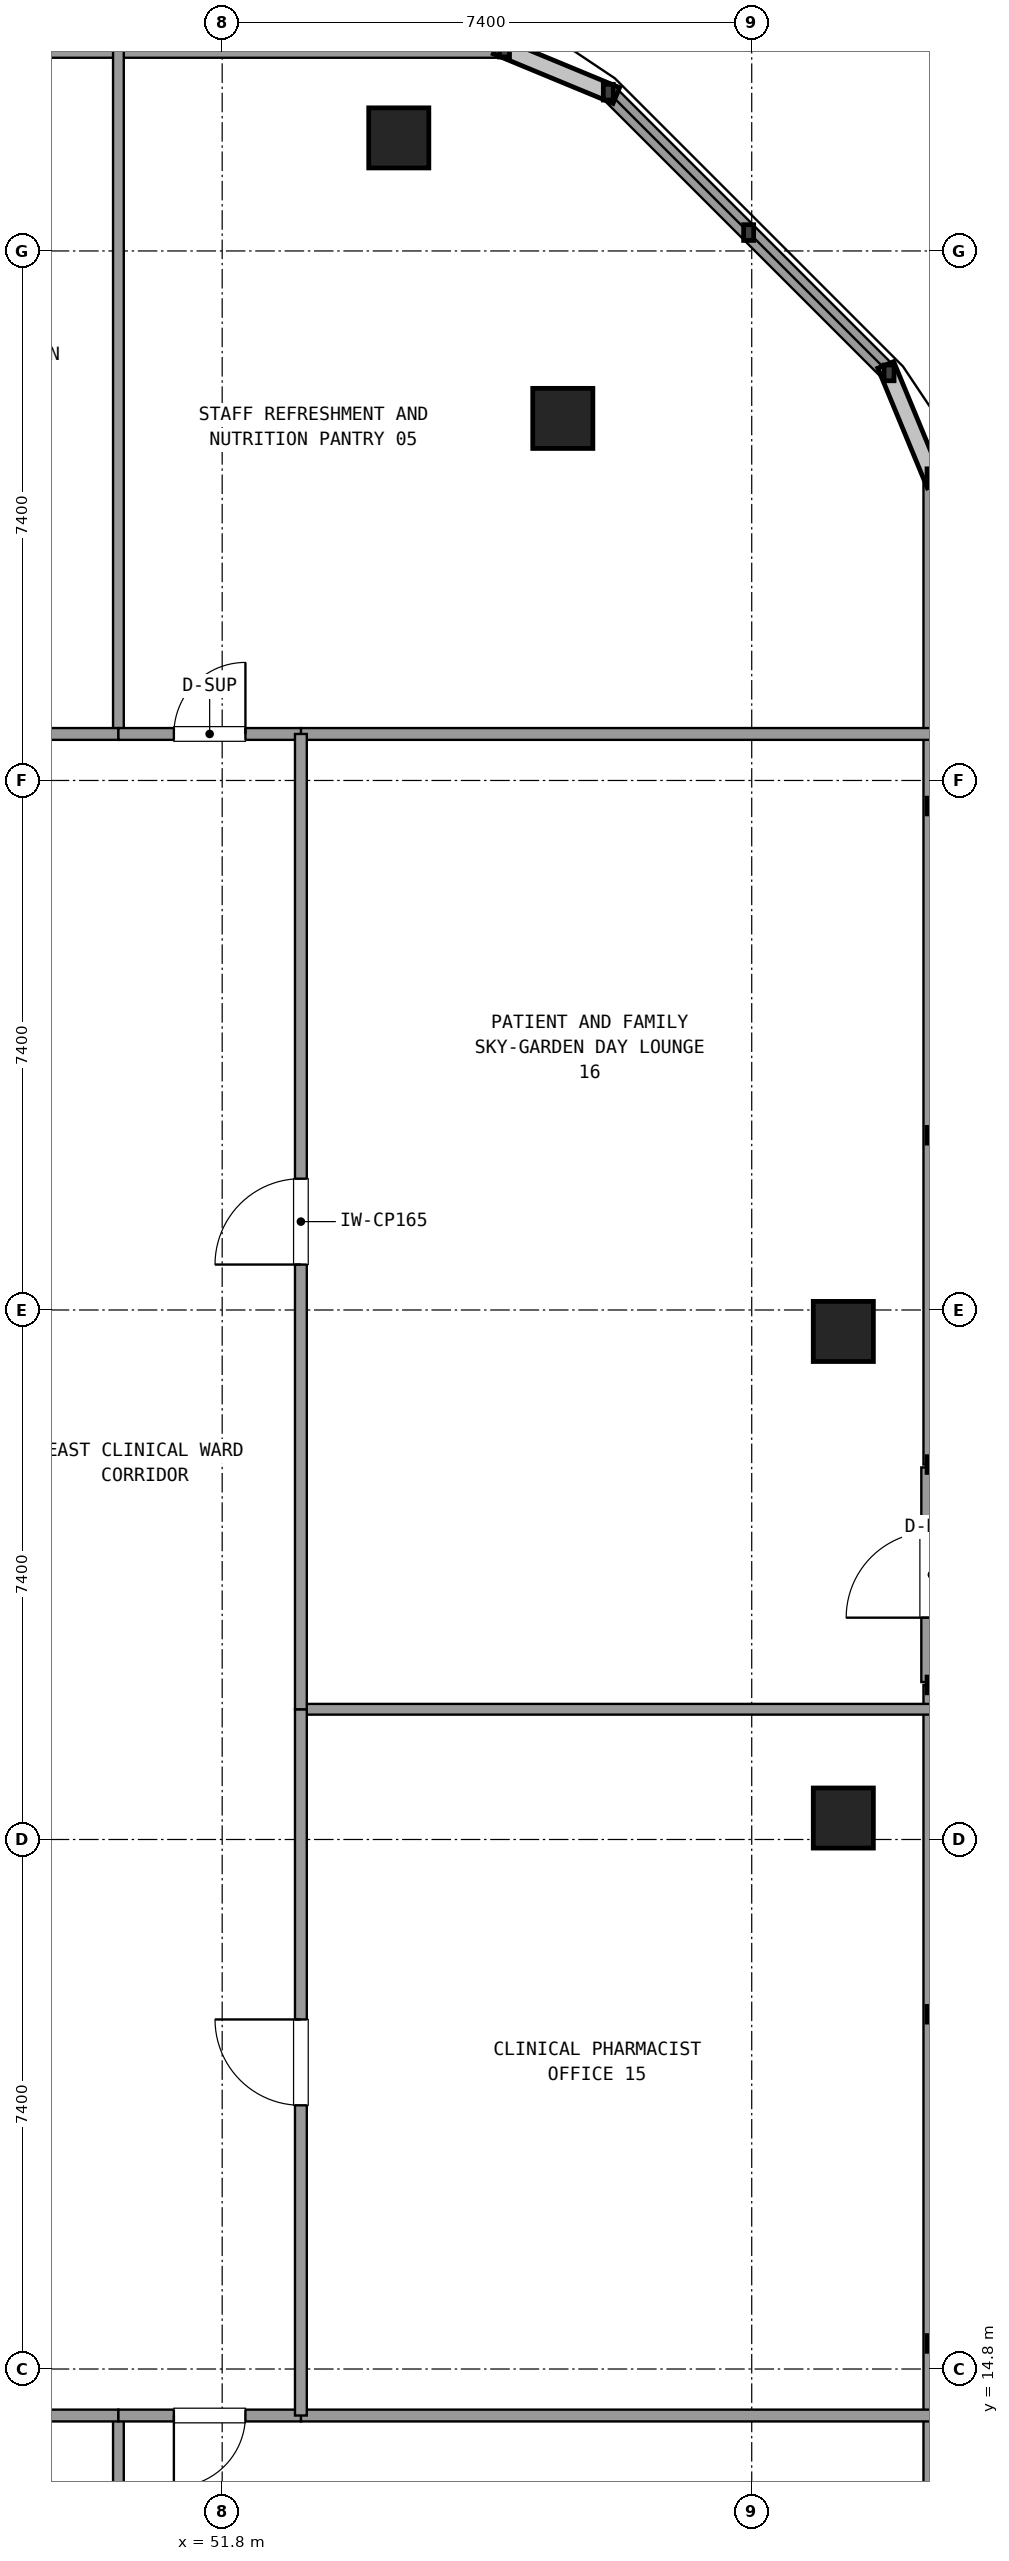
"""IFC4 building model, lengths in metres.
Left out: names, types, materials, properties, quantities, classifications, styles, units other than length and angle.
Written with IfcOpenShell. Run it as: python <this file> out.ifc"""

import sys

from ifc_helpers import new_model, si_unit, direction, frame, frame_2d, origin, origin_2d, place, context, subcontext, project, spatial, rectangle, extrude, element, fill, save


model = new_model("IFC4")
c1 = context("Model", 3, precision=1e-05, world=origin(), true_north=direction((0.0, 1.0)))
c2 = subcontext(c1, "Body", "Model", "MODEL_VIEW")
j1 = project(units=[si_unit("LENGTHUNIT", "METRE"), si_unit("PLANEANGLEUNIT", "RADIAN")], contexts=[c1])
p1 = place(None, origin())
s1 = spatial("IfcSite", under=j1, at=p1, CompositionType="ELEMENT")
p2 = place(p1, origin())
s2 = spatial("IfcBuilding", under=s1, at=p2, CompositionType="ELEMENT")
p3 = place(p2, frame((0.0, 0.0, 242.82)))
s3 = spatial("IfcBuildingStorey", under=s2, at=p3, CompositionType="ELEMENT", Elevation=242.82)
for number, where, z_axis, x_axis in (
    (1, (60.48, 22.5, 0.0), (0.0, 0.0, 1.0), (1.0, 0.0, 0.0)),
    (2, (60.48, 29.3, 0.0), (0.0, 0.0, 1.0), (1.0, 0.0, 0.0)),
    (3, (56.56, 42.06, 0.0), (0.0, 0.0, 1.0), (1.0, 0.0, 0.0)),
    (4, (54.268, 45.98, 0.0), (0.0, 0.0, 1.0), (1.0, 0.0, 0.0)),
):
    element("IfcColumn", number, at=place(p3, frame(where, z_axis=z_axis, x_axis=x_axis)), inside=s3, PredefinedType="COLUMN", context=c2, shape_type="SweptSolid", body=[
        extrude(rectangle(XDim=0.84, YDim=0.84, at=origin_2d()), origin(), (0.0, 0.0, 1.0), 3.6),
    ])
p4 = place(p3, frame((61.72, 24.4, 0.0), z_axis=(0.0, 0.0, 1.0), x_axis=(0.0, 1.0, 0.0)))
e5 = element("IfcWall", 5, at=p4, inside=s3, PredefinedType="SOLIDWALL", context=c2, shape_type="SweptSolid", body=[
    extrude(rectangle(XDim=3.0, YDim=0.3, at=frame_2d((1.5, 0.0))), origin(), (0.0, 0.0, 1.0), 2.69),
])
p5 = place(p4, frame((0.9, 0.0, 0.0)))
e6 = element("IfcOpeningElement", 6, at=p5, cuts=e5, PredefinedType="OPENING", context=c2, shape_type="SweptSolid", body=[
    extrude(rectangle(XDim=1.2, YDim=2.2, at=frame_2d((0.6, 1.1))), frame((0.0, 0.16, 0.0), z_axis=(0.0, -1.0, 0.0), x_axis=(1.0, 0.0, 0.0)), (0.0, 0.0, 1.0), 0.32),
])
for number, where, z_axis, x_axis in (
    (7, (61.72, 10.555, 0.0), (0.0, 0.0, 1.0), (0.0, 1.0, 0.0)),
    (8, (61.72, 27.44, 0.0), (0.0, 0.0, 1.0), (0.0, 1.0, 0.0)),
):
    element("IfcWall", number, at=place(p3, frame(where, z_axis=z_axis, x_axis=x_axis)), inside=s3, PredefinedType="SOLIDWALL", context=c2, shape_type="SweptSolid", body=[
        extrude(rectangle(XDim=13.805, YDim=0.24, at=frame_2d((6.903, 0.0))), origin(), (0.0, 0.0, 1.0), 0.85),
    ])
p6 = place(p3, frame((61.119, 42.696, 0.0), z_axis=(0.0, 0.0, 1.0), x_axis=(-0.707106781187, 0.707106781187, 0.0)))
e9 = element("IfcWall", 9, at=p6, inside=s3, PredefinedType="SOLIDWALL", context=c2, shape_type="SweptSolid", body=[
    extrude(rectangle(XDim=5.548, YDim=0.24, at=frame_2d((2.774, 0.0))), origin(), (0.0, 0.0, 1.0), 0.85),
])
p7 = place(p3, frame((55.745, 47.22, 0.0), z_axis=(0.0, 0.0, 1.0), x_axis=(-1.0, 0.0, 0.0)))
e10 = element("IfcWall", 10, at=p7, inside=s3, PredefinedType="SOLIDWALL", context=c2, shape_type="SweptSolid", body=[
    extrude(rectangle(XDim=37.49, YDim=0.24, at=frame_2d((18.745, 0.0))), origin(), (0.0, 0.0, 1.0), 0.85),
])
for number, where, z_axis, x_axis in (
    (11, (52.9, 37.65, 0.0), (0.0, 0.0, 1.0), (1.0, 0.0, 0.0)),
    (12, (52.9, 14.15, 0.0), (0.0, 0.0, 1.0), (1.0, 0.0, 0.0)),
):
    element("IfcWall", number, at=place(p3, frame(where, z_axis=z_axis, x_axis=x_axis)), inside=s3, PredefinedType="PARTITIONING", context=c2, shape_type="SweptSolid", body=[
        extrude(rectangle(XDim=8.8, YDim=0.165, at=frame_2d((4.4, 0.0))), origin(), (0.0, 0.0, 1.0), 2.61),
    ])
p8 = place(p3, frame((50.35, 37.65, 0.0), z_axis=(0.0, 0.0, 1.0), x_axis=(0.0, 1.0, 0.0)))
e13 = element("IfcWall", 13, at=p8, inside=s3, PredefinedType="PARTITIONING", context=c2, shape_type="SweptSolid", body=[
    extrude(rectangle(XDim=9.55, YDim=0.15, at=frame_2d((4.775, 0.0))), origin(), (0.0, 0.0, 1.0), 2.61),
])
p9 = place(p3, frame((45.525, 37.65, 0.0), z_axis=(0.0, 0.0, 1.0), x_axis=(1.0, 0.0, 0.0)))
e14 = element("IfcWall", 14, at=p9, inside=s3, PredefinedType="PARTITIONING", context=c2, shape_type="SweptSolid", body=[
    extrude(rectangle(XDim=4.825, YDim=0.165, at=frame_2d((2.413, 0.0))), origin(), (0.0, 0.0, 1.0), 2.61),
])
p10 = place(p9, frame((1.813, 0.0, 0.0)))
e15 = element("IfcOpeningElement", 15, at=p10, cuts=e14, PredefinedType="OPENING", context=c2, shape_type="SweptSolid", body=[
    extrude(rectangle(XDim=1.2, YDim=2.15, at=frame_2d((0.6, 1.075))), frame((0.0, 0.093, 0.0), z_axis=(0.0, -1.0, 0.0), x_axis=(1.0, 0.0, 0.0)), (0.0, 0.0, 1.0), 0.185),
])
p11 = place(p3, frame((50.35, 37.65, 0.0), z_axis=(0.0, 0.0, 1.0), x_axis=(1.0, 0.0, 0.0)))
e16 = element("IfcWall", 16, at=p11, inside=s3, PredefinedType="PARTITIONING", context=c2, shape_type="SweptSolid", body=[
    extrude(rectangle(XDim=2.55, YDim=0.165, at=frame_2d((1.275, 0.0))), origin(), (0.0, 0.0, 1.0), 2.61),
])
p12 = place(p11, frame((0.775, 0.0, 0.0)))
e17 = element("IfcOpeningElement", 17, at=p12, cuts=e16, PredefinedType="OPENING", context=c2, shape_type="SweptSolid", body=[
    extrude(rectangle(XDim=1.0, YDim=2.15, at=frame_2d((0.5, 1.075))), frame((0.0, 0.093, 0.0), z_axis=(0.0, -1.0, 0.0), x_axis=(1.0, 0.0, 0.0)), (0.0, 0.0, 1.0), 0.185),
])
p13 = place(p3, frame((50.35, 14.15, 0.0), z_axis=(0.0, 0.0, 1.0), x_axis=(0.0, -1.0, 0.0)))
e18 = element("IfcWall", 18, at=p13, inside=s3, PredefinedType="PARTITIONING", context=c2, shape_type="SweptSolid", body=[
    extrude(rectangle(XDim=9.55, YDim=0.15, at=frame_2d((4.775, 0.0))), origin(), (0.0, 0.0, 1.0), 2.61),
])
p14 = place(p3, frame((45.051, 14.15, 0.0), z_axis=(0.0, 0.0, 1.0), x_axis=(1.0, 0.0, 0.0)))
e19 = element("IfcWall", 19, at=p14, inside=s3, PredefinedType="PARTITIONING", context=c2, shape_type="SweptSolid", body=[
    extrude(rectangle(XDim=5.299, YDim=0.165, at=frame_2d((2.649, 0.0))), origin(), (0.0, 0.0, 1.0), 2.61),
])
p15 = place(p14, frame((2.049, 0.0, 0.0)))
e20 = element("IfcOpeningElement", 20, at=p15, cuts=e19, PredefinedType="OPENING", context=c2, shape_type="SweptSolid", body=[
    extrude(rectangle(XDim=1.2, YDim=2.15, at=frame_2d((0.6, 1.075))), frame((0.0, 0.093, 0.0), z_axis=(0.0, -1.0, 0.0), x_axis=(1.0, 0.0, 0.0)), (0.0, 0.0, 1.0), 0.185),
])
p16 = place(p3, frame((50.35, 14.15, 0.0), z_axis=(0.0, 0.0, 1.0), x_axis=(1.0, 0.0, 0.0)))
e21 = element("IfcWall", 21, at=p16, inside=s3, PredefinedType="PARTITIONING", context=c2, shape_type="SweptSolid", body=[
    extrude(rectangle(XDim=2.55, YDim=0.165, at=frame_2d((1.275, 0.0))), origin(), (0.0, 0.0, 1.0), 2.61),
])
p17 = place(p16, frame((0.775, 0.0, 0.0)))
e22 = element("IfcOpeningElement", 22, at=p17, cuts=e21, PredefinedType="OPENING", context=c2, shape_type="SweptSolid", body=[
    extrude(rectangle(XDim=1.0, YDim=2.15, at=frame_2d((0.5, 1.075))), frame((0.0, 0.093, 0.0), z_axis=(0.0, -1.0, 0.0), x_axis=(1.0, 0.0, 0.0)), (0.0, 0.0, 1.0), 0.185),
])
p18 = place(p3, frame((52.9, 24.02, 0.0), z_axis=(0.0, 0.0, 1.0), x_axis=(1.0, 0.0, 0.0)))
e23 = element("IfcWall", 23, at=p18, inside=s3, PredefinedType="PARTITIONING", context=c2, shape_type="SweptSolid", body=[
    extrude(rectangle(XDim=8.8, YDim=0.15, at=frame_2d((4.4, 0.0))), origin(), (0.0, 0.0, 1.0), 2.61),
])
p19 = place(p3, frame((52.9, 14.15, 0.0), z_axis=(0.0, 0.0, 1.0), x_axis=(0.0, 1.0, 0.0)))
e24 = element("IfcWall", 24, at=p19, inside=s3, PredefinedType="PARTITIONING", context=c2, shape_type="SweptSolid", body=[
    extrude(rectangle(XDim=9.87, YDim=0.165, at=frame_2d((4.935, 0.0))), origin(), (0.0, 0.0, 1.0), 2.61),
])
p20 = place(p19, frame((4.335, 0.0, 0.0)))
e25 = element("IfcOpeningElement", 25, at=p20, cuts=e24, PredefinedType="OPENING", context=c2, shape_type="SweptSolid", body=[
    extrude(rectangle(XDim=1.2, YDim=2.15, at=frame_2d((0.6, 1.075))), frame((0.0, 0.093, 0.0), z_axis=(0.0, -1.0, 0.0), x_axis=(1.0, 0.0, 0.0)), (0.0, 0.0, 1.0), 0.185),
])
p21 = place(p3, frame((52.9, 24.02, 0.0), z_axis=(0.0, 0.0, 1.0), x_axis=(0.0, 1.0, 0.0)))
e26 = element("IfcWall", 26, at=p21, inside=s3, PredefinedType="PARTITIONING", context=c2, shape_type="SweptSolid", body=[
    extrude(rectangle(XDim=13.63, YDim=0.165, at=frame_2d((6.815, 0.0))), origin(), (0.0, 0.0, 1.0), 2.61),
])
p22 = place(p21, frame((6.215, 0.0, 0.0)))
e27 = element("IfcOpeningElement", 27, at=p22, cuts=e26, PredefinedType="OPENING", context=c2, shape_type="SweptSolid", body=[
    extrude(rectangle(XDim=1.2, YDim=2.15, at=frame_2d((0.6, 1.075))), frame((0.0, 0.093, 0.0), z_axis=(0.0, -1.0, 0.0), x_axis=(1.0, 0.0, 0.0)), (0.0, 0.0, 1.0), 0.185),
])
p23 = place(p12, origin())
e28 = element("IfcDoor", 28, at=p23, inside=s3, OperationType="SINGLE_SWING_RIGHT", PredefinedType="DOOR", context=c2, shape_type="SweptSolid", body=[
    extrude(rectangle(XDim=1.0, YDim=2.15, at=frame_2d((0.5, 1.075))), frame((0.0, 0.025, 0.0), z_axis=(0.0, -1.0, 0.0), x_axis=(1.0, 0.0, 0.0)), (0.0, 0.0, 1.0), 0.05),
])
fill(e17, e28)
p24 = place(p17, frame((1.0, 0.0, 0.0), z_axis=(0.0, 0.0, 1.0), x_axis=(-1.0, 0.0, 0.0)))
e29 = element("IfcDoor", 29, at=p24, inside=s3, OperationType="SINGLE_SWING_LEFT", PredefinedType="DOOR", context=c2, shape_type="SweptSolid", body=[
    extrude(rectangle(XDim=1.0, YDim=2.15, at=frame_2d((0.5, 1.075))), frame((0.0, 0.025, 0.0), z_axis=(0.0, -1.0, 0.0), x_axis=(1.0, 0.0, 0.0)), (0.0, 0.0, 1.0), 0.05),
])
fill(e22, e29)
p25 = place(p20, origin())
e30 = element("IfcDoor", 30, at=p25, inside=s3, OperationType="SINGLE_SWING_RIGHT", PredefinedType="DOOR", context=c2, shape_type="SweptSolid", body=[
    extrude(rectangle(XDim=1.2, YDim=2.15, at=frame_2d((0.6, 1.075))), frame((0.0, 0.025, 0.0), z_axis=(0.0, -1.0, 0.0), x_axis=(1.0, 0.0, 0.0)), (0.0, 0.0, 1.0), 0.05),
])
fill(e25, e30)
p26 = place(p22, origin())
e31 = element("IfcDoor", 31, at=p26, inside=s3, OperationType="SINGLE_SWING_LEFT", PredefinedType="DOOR", context=c2, shape_type="SweptSolid", body=[
    extrude(rectangle(XDim=1.2, YDim=2.15, at=frame_2d((0.6, 1.075))), frame((0.0, 0.025, 0.0), z_axis=(0.0, -1.0, 0.0), x_axis=(1.0, 0.0, 0.0)), (0.0, 0.0, 1.0), 0.05),
])
fill(e27, e31)
save(model, sys.argv[1])
